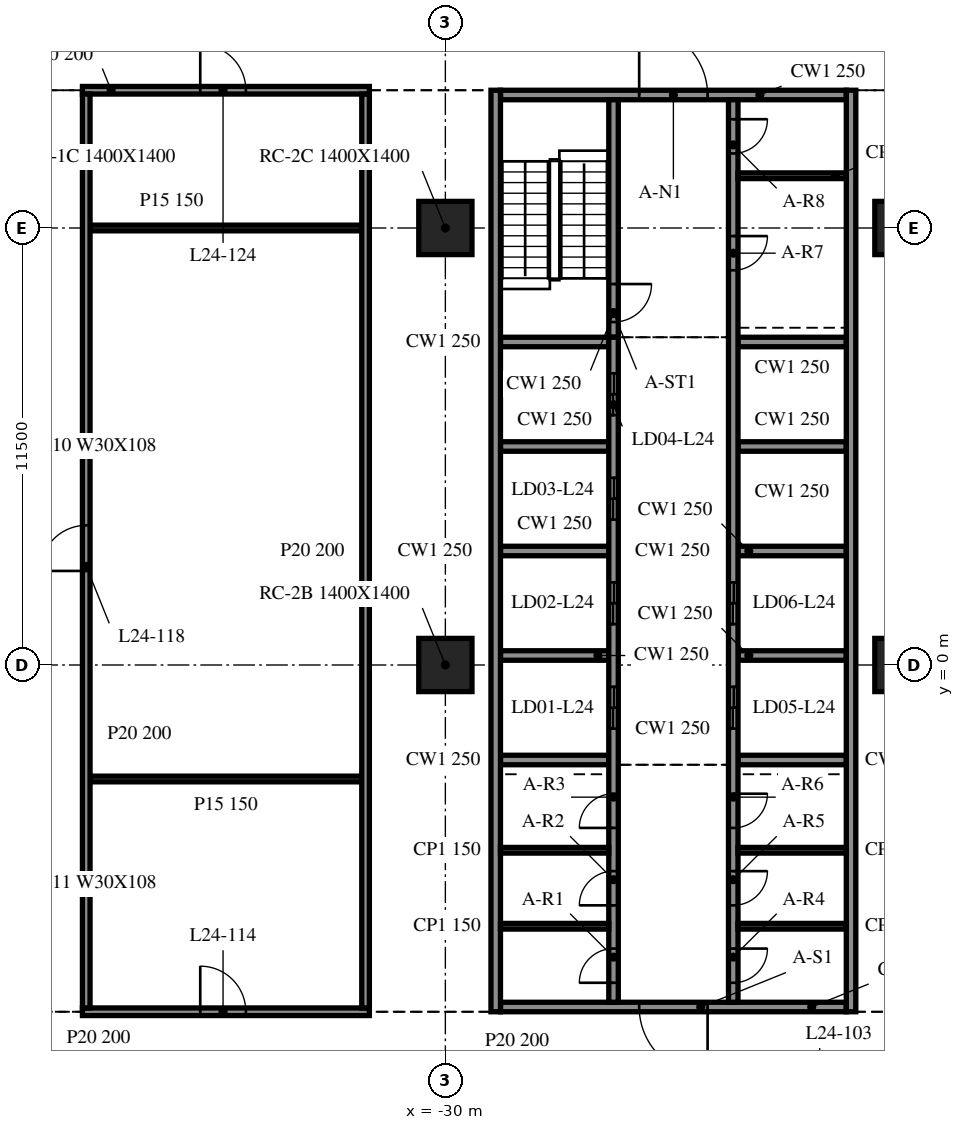
"""IFC4 building model, lengths in metres.
Left out: names, types, materials, properties, quantities, classifications, styles, units other than length and angle.
Written with IfcOpenShell. Run it as: python <this file> out.ifc"""

import sys

from ifc_helpers import new_model, si_unit, direction, frame, frame_2d, origin, origin_2d, place, context, subcontext, project, spatial, rectangle, extrude, element, fill, save


model = new_model("IFC4")
c1 = context("Model", 3, precision=1e-05, world=origin(), true_north=direction((0.0, 1.0)))
c2 = subcontext(c1, "Body", "Model", "MODEL_VIEW")
j1 = project(units=[si_unit("LENGTHUNIT", "METRE"), si_unit("PLANEANGLEUNIT", "RADIAN")], contexts=[c1])
p1 = place(None, origin())
s1 = spatial("IfcSite", under=j1, at=p1, CompositionType="ELEMENT")
p2 = place(p1, origin())
s2 = spatial("IfcBuilding", under=s1, at=p2, CompositionType="ELEMENT")
p3 = place(p2, frame((0.0, 0.0, 105.3)))
s3 = spatial("IfcBuildingStorey", under=s2, at=p3, CompositionType="ELEMENT", Elevation=105.3)
for number, where, z_axis, x_axis in (
    (1, (-30.0, 0.0, -0.34), (0.0, 0.0, 1.0), (1.0, 0.0, 0.0)),
    (2, (-30.0, 11.5, -0.34), (0.0, 0.0, 1.0), (1.0, 0.0, 0.0)),
    (3, (-18.0, 0.0, -0.34), (0.0, 0.0, 1.0), (1.0, 0.0, 0.0)),
    (4, (-18.0, 11.5, -0.34), (0.0, 0.0, 1.0), (1.0, 0.0, 0.0)),
):
    element("IfcColumn", number, at=place(p3, frame(where, z_axis=z_axis, x_axis=x_axis)), inside=s3, PredefinedType="COLUMN", context=c2, shape_type="SweptSolid", body=[
        extrude(rectangle(XDim=1.4, YDim=1.4, at=origin_2d()), origin(), (0.0, 0.0, 1.0), 4.1),
    ])
for number, where, z_axis, x_axis in (
    (5, (-28.675, 15.125, 0.0), (0.0, 0.0, 1.0), (0.0, -1.0, 0.0)),
    (6, (-19.325, -9.125, 0.0), (0.0, 0.0, 1.0), (0.0, 1.0, 0.0)),
):
    element("IfcWall", number, at=place(p3, frame(where, z_axis=z_axis, x_axis=x_axis)), inside=s3, PredefinedType="SOLIDWALL", context=c2, shape_type="SweptSolid", body=[
        extrude(rectangle(XDim=24.25, YDim=0.25, at=frame_2d((12.125, 0.0))), origin(), (0.0, 0.0, 1.0), 3.76),
    ])
p4 = place(p3, frame((-19.45, -9.0, 0.0), z_axis=(0.0, 0.0, 1.0), x_axis=(-1.0, 0.0, 0.0)))
e7 = element("IfcWall", 7, at=p4, inside=s3, PredefinedType="SOLIDWALL", context=c2, shape_type="SweptSolid", body=[
    extrude(rectangle(XDim=9.1, YDim=0.25, at=frame_2d((4.55, 0.0))), origin(), (0.0, 0.0, 1.0), 3.76),
])
p5 = place(p4, frame((3.65, 0.0, 0.0)))
e8 = element("IfcOpeningElement", 8, at=p5, cuts=e7, PredefinedType="OPENING", context=c2, shape_type="SweptSolid", body=[
    extrude(rectangle(XDim=1.8, YDim=2.1, at=frame_2d((0.9, 1.05))), frame((0.0, 0.135, 0.0), z_axis=(0.0, -1.0, 0.0), x_axis=(1.0, 0.0, 0.0)), (0.0, 0.0, 1.0), 0.27),
])
p6 = place(p3, frame((-28.55, 15.0, 0.0), z_axis=(0.0, 0.0, 1.0), x_axis=(1.0, 0.0, 0.0)))
e9 = element("IfcWall", 9, at=p6, inside=s3, PredefinedType="SOLIDWALL", context=c2, shape_type="SweptSolid", body=[
    extrude(rectangle(XDim=9.1, YDim=0.25, at=frame_2d((4.55, 0.0))), origin(), (0.0, 0.0, 1.0), 3.76),
])
p7 = place(p6, frame((3.65, 0.0, 0.0)))
e10 = element("IfcOpeningElement", 10, at=p7, cuts=e9, PredefinedType="OPENING", context=c2, shape_type="SweptSolid", body=[
    extrude(rectangle(XDim=1.8, YDim=2.1, at=frame_2d((0.9, 1.05))), frame((0.0, 0.135, 0.0), z_axis=(0.0, -1.0, 0.0), x_axis=(1.0, 0.0, 0.0)), (0.0, 0.0, 1.0), 0.27),
])
p8 = place(p3, frame((-25.575, -8.875, 0.0), z_axis=(0.0, 0.0, 1.0), x_axis=(0.0, 1.0, 0.0)))
e11 = element("IfcWall", 11, at=p8, inside=s3, PredefinedType="SOLIDWALL", context=c2, shape_type="SweptSolid", body=[
    extrude(rectangle(XDim=17.5, YDim=0.25, at=frame_2d((8.75, 0.0))), origin(), (0.0, 0.0, 1.0), 3.76),
])
p9 = place(p8, frame((7.2, 0.0, 0.0)))
e12 = element("IfcOpeningElement", 12, at=p9, cuts=e11, PredefinedType="OPENING", context=c2, shape_type="SweptSolid", body=[
    extrude(rectangle(XDim=1.1, YDim=2.1, at=frame_2d((0.55, 1.05))), frame((0.0, 0.135, 0.0), z_axis=(0.0, -1.0, 0.0), x_axis=(1.0, 0.0, 0.0)), (0.0, 0.0, 1.0), 0.27),
])
p10 = place(p8, frame((9.95, 0.0, 0.0)))
e13 = element("IfcOpeningElement", 13, at=p10, cuts=e11, PredefinedType="OPENING", context=c2, shape_type="SweptSolid", body=[
    extrude(rectangle(XDim=1.1, YDim=2.1, at=frame_2d((0.55, 1.05))), frame((0.0, 0.135, 0.0), z_axis=(0.0, -1.0, 0.0), x_axis=(1.0, 0.0, 0.0)), (0.0, 0.0, 1.0), 0.27),
])
p11 = place(p8, frame((12.7, 0.0, 0.0)))
e14 = element("IfcOpeningElement", 14, at=p11, cuts=e11, PredefinedType="OPENING", context=c2, shape_type="SweptSolid", body=[
    extrude(rectangle(XDim=1.1, YDim=2.1, at=frame_2d((0.55, 1.05))), frame((0.0, 0.135, 0.0), z_axis=(0.0, -1.0, 0.0), x_axis=(1.0, 0.0, 0.0)), (0.0, 0.0, 1.0), 0.27),
])
p12 = place(p8, frame((15.45, 0.0, 0.0)))
e15 = element("IfcOpeningElement", 15, at=p12, cuts=e11, PredefinedType="OPENING", context=c2, shape_type="SweptSolid", body=[
    extrude(rectangle(XDim=1.1, YDim=2.1, at=frame_2d((0.55, 1.05))), frame((0.0, 0.135, 0.0), z_axis=(0.0, -1.0, 0.0), x_axis=(1.0, 0.0, 0.0)), (0.0, 0.0, 1.0), 0.27),
])
p13 = place(p8, frame((0.512, 0.0, 0.0)))
e16 = element("IfcOpeningElement", 16, at=p13, cuts=e11, PredefinedType="OPENING", context=c2, shape_type="SweptSolid", body=[
    extrude(rectangle(XDim=0.9, YDim=2.1, at=frame_2d((0.45, 1.05))), frame((0.0, 0.135, 0.0), z_axis=(0.0, -1.0, 0.0), x_axis=(1.0, 0.0, 0.0)), (0.0, 0.0, 1.0), 0.27),
])
p14 = place(p8, frame((2.55, 0.0, 0.0)))
e17 = element("IfcOpeningElement", 17, at=p14, cuts=e11, PredefinedType="OPENING", context=c2, shape_type="SweptSolid", body=[
    extrude(rectangle(XDim=0.9, YDim=2.1, at=frame_2d((0.45, 1.05))), frame((0.0, 0.135, 0.0), z_axis=(0.0, -1.0, 0.0), x_axis=(1.0, 0.0, 0.0)), (0.0, 0.0, 1.0), 0.27),
])
p15 = place(p8, frame((4.587, 0.0, 0.0)))
e18 = element("IfcOpeningElement", 18, at=p15, cuts=e11, PredefinedType="OPENING", context=c2, shape_type="SweptSolid", body=[
    extrude(rectangle(XDim=0.9, YDim=2.1, at=frame_2d((0.45, 1.05))), frame((0.0, 0.135, 0.0), z_axis=(0.0, -1.0, 0.0), x_axis=(1.0, 0.0, 0.0)), (0.0, 0.0, 1.0), 0.27),
])
p16 = place(p3, frame((-25.575, 14.875, 0.0), z_axis=(0.0, 0.0, 1.0), x_axis=(0.0, -1.0, 0.0)))
e19 = element("IfcWall", 19, at=p16, inside=s3, PredefinedType="SOLIDWALL", context=c2, shape_type="SweptSolid", body=[
    extrude(rectangle(XDim=6.25, YDim=0.25, at=frame_2d((3.125, 0.0))), origin(), (0.0, 0.0, 1.0), 3.76),
])
p17 = place(p16, frame((4.85, 0.0, 0.0)))
e20 = element("IfcOpeningElement", 20, at=p17, cuts=e19, PredefinedType="OPENING", context=c2, shape_type="SweptSolid", body=[
    extrude(rectangle(XDim=1.0, YDim=2.1, at=frame_2d((0.5, 1.05))), frame((0.0, 0.135, 0.0), z_axis=(0.0, -1.0, 0.0), x_axis=(1.0, 0.0, 0.0)), (0.0, 0.0, 1.0), 0.27),
])
p18 = place(p3, frame((-22.425, 14.875, 0.0), z_axis=(0.0, 0.0, 1.0), x_axis=(0.0, -1.0, 0.0)))
e21 = element("IfcWall", 21, at=p18, inside=s3, PredefinedType="SOLIDWALL", context=c2, shape_type="SweptSolid", body=[
    extrude(rectangle(XDim=23.75, YDim=0.25, at=frame_2d((11.875, 0.0))), origin(), (0.0, 0.0, 1.0), 3.76),
])
p19 = place(p18, frame((15.45, 0.0, 0.0)))
e22 = element("IfcOpeningElement", 22, at=p19, cuts=e21, PredefinedType="OPENING", context=c2, shape_type="SweptSolid", body=[
    extrude(rectangle(XDim=1.1, YDim=2.1, at=frame_2d((0.55, 1.05))), frame((0.0, 0.135, 0.0), z_axis=(0.0, -1.0, 0.0), x_axis=(1.0, 0.0, 0.0)), (0.0, 0.0, 1.0), 0.27),
])
p20 = place(p18, frame((12.7, 0.0, 0.0)))
e23 = element("IfcOpeningElement", 23, at=p20, cuts=e21, PredefinedType="OPENING", context=c2, shape_type="SweptSolid", body=[
    extrude(rectangle(XDim=1.1, YDim=2.1, at=frame_2d((0.55, 1.05))), frame((0.0, 0.135, 0.0), z_axis=(0.0, -1.0, 0.0), x_axis=(1.0, 0.0, 0.0)), (0.0, 0.0, 1.0), 0.27),
])
p21 = place(p18, frame((22.337, 0.0, 0.0)))
e24 = element("IfcOpeningElement", 24, at=p21, cuts=e21, PredefinedType="OPENING", context=c2, shape_type="SweptSolid", body=[
    extrude(rectangle(XDim=0.9, YDim=2.1, at=frame_2d((0.45, 1.05))), frame((0.0, 0.135, 0.0), z_axis=(0.0, -1.0, 0.0), x_axis=(1.0, 0.0, 0.0)), (0.0, 0.0, 1.0), 0.27),
])
p22 = place(p18, frame((20.3, 0.0, 0.0)))
e25 = element("IfcOpeningElement", 25, at=p22, cuts=e21, PredefinedType="OPENING", context=c2, shape_type="SweptSolid", body=[
    extrude(rectangle(XDim=0.9, YDim=2.1, at=frame_2d((0.45, 1.05))), frame((0.0, 0.135, 0.0), z_axis=(0.0, -1.0, 0.0), x_axis=(1.0, 0.0, 0.0)), (0.0, 0.0, 1.0), 0.27),
])
p23 = place(p18, frame((18.262, 0.0, 0.0)))
e26 = element("IfcOpeningElement", 26, at=p23, cuts=e21, PredefinedType="OPENING", context=c2, shape_type="SweptSolid", body=[
    extrude(rectangle(XDim=0.9, YDim=2.1, at=frame_2d((0.45, 1.05))), frame((0.0, 0.135, 0.0), z_axis=(0.0, -1.0, 0.0), x_axis=(1.0, 0.0, 0.0)), (0.0, 0.0, 1.0), 0.27),
])
p24 = place(p18, frame((3.587, 0.0, 0.0)))
e27 = element("IfcOpeningElement", 27, at=p24, cuts=e21, PredefinedType="OPENING", context=c2, shape_type="SweptSolid", body=[
    extrude(rectangle(XDim=0.9, YDim=2.1, at=frame_2d((0.45, 1.05))), frame((0.0, 0.135, 0.0), z_axis=(0.0, -1.0, 0.0), x_axis=(1.0, 0.0, 0.0)), (0.0, 0.0, 1.0), 0.27),
])
p25 = place(p18, frame((0.512, 0.0, 0.0)))
e28 = element("IfcOpeningElement", 28, at=p25, cuts=e21, PredefinedType="OPENING", context=c2, shape_type="SweptSolid", body=[
    extrude(rectangle(XDim=0.9, YDim=2.1, at=frame_2d((0.45, 1.05))), frame((0.0, 0.135, 0.0), z_axis=(0.0, -1.0, 0.0), x_axis=(1.0, 0.0, 0.0)), (0.0, 0.0, 1.0), 0.27),
])
for number, where, z_axis, x_axis in (
    (29, (-28.55, -2.5, 0.0), (0.0, 0.0, 1.0), (1.0, 0.0, 0.0)),
    (30, (-28.55, 0.25, 0.0), (0.0, 0.0, 1.0), (1.0, 0.0, 0.0)),
    (31, (-28.55, 3.0, 0.0), (0.0, 0.0, 1.0), (1.0, 0.0, 0.0)),
    (32, (-28.55, 5.75, 0.0), (0.0, 0.0, 1.0), (1.0, 0.0, 0.0)),
    (33, (-28.55, 8.5, 0.0), (0.0, 0.0, 1.0), (1.0, 0.0, 0.0)),
    (34, (-22.3, -2.5, 0.0), (0.0, 0.0, 1.0), (1.0, 0.0, 0.0)),
    (35, (-22.3, 0.25, 0.0), (0.0, 0.0, 1.0), (1.0, 0.0, 0.0)),
    (36, (-22.3, 3.0, 0.0), (0.0, 0.0, 1.0), (1.0, 0.0, 0.0)),
    (37, (-22.3, 5.75, 0.0), (0.0, 0.0, 1.0), (1.0, 0.0, 0.0)),
    (38, (-22.3, 8.5, 0.0), (0.0, 0.0, 1.0), (1.0, 0.0, 0.0)),
):
    element("IfcWall", number, at=place(p3, frame(where, z_axis=z_axis, x_axis=x_axis)), inside=s3, PredefinedType="SOLIDWALL", context=c2, shape_type="SweptSolid", body=[
        extrude(rectangle(XDim=2.85, YDim=0.25, at=frame_2d((1.425, 0.0))), origin(), (0.0, 0.0, 1.0), 3.76),
    ])
for number, where, z_axis, x_axis in (
    (39, (-28.55, -6.875, 0.0), (0.0, 0.0, 1.0), (1.0, 0.0, 0.0)),
    (40, (-28.55, -4.875, 0.0), (0.0, 0.0, 1.0), (1.0, 0.0, 0.0)),
    (41, (-22.3, -6.875, 0.0), (0.0, 0.0, 1.0), (1.0, 0.0, 0.0)),
    (42, (-22.3, -4.875, 0.0), (0.0, 0.0, 1.0), (1.0, 0.0, 0.0)),
    (43, (-22.3, 12.875, 0.0), (0.0, 0.0, 1.0), (1.0, 0.0, 0.0)),
):
    element("IfcWall", number, at=place(p3, frame(where, z_axis=z_axis, x_axis=x_axis)), inside=s3, PredefinedType="PARTITIONING", context=c2, shape_type="SweptSolid", body=[
        extrude(rectangle(XDim=2.85, YDim=0.15, at=frame_2d((1.425, 0.0))), origin(), (0.0, 0.0, 1.0), 3.76),
    ])
p26 = place(p3, frame((-39.55, -9.125, 0.0), z_axis=(0.0, 0.0, 1.0), x_axis=(1.0, 0.0, 0.0)))
e44 = element("IfcWall", 44, at=p26, inside=s3, PredefinedType="PARTITIONING", context=c2, shape_type="SweptSolid", body=[
    extrude(rectangle(XDim=7.55, YDim=0.2, at=frame_2d((3.775, 0.0))), origin(), (0.0, 0.0, 1.0), 3.76),
])
p27 = place(p26, frame((3.1, 0.0, 0.0)))
e45 = element("IfcOpeningElement", 45, at=p27, cuts=e44, PredefinedType="OPENING", context=c2, shape_type="SweptSolid", body=[
    extrude(rectangle(XDim=1.2, YDim=2.1, at=frame_2d((0.6, 1.05))), frame((0.0, 0.11, 0.0), z_axis=(0.0, -1.0, 0.0), x_axis=(1.0, 0.0, 0.0)), (0.0, 0.0, 1.0), 0.22),
])
for number, where, z_axis, x_axis in (
    (46, (-39.35, -3.0, 0.0), (0.0, 0.0, 1.0), (1.0, 0.0, 0.0)),
    (47, (-39.35, 11.5, 0.0), (0.0, 0.0, 1.0), (1.0, 0.0, 0.0)),
):
    element("IfcWall", number, at=place(p3, frame(where, z_axis=z_axis, x_axis=x_axis)), inside=s3, PredefinedType="PARTITIONING", context=c2, shape_type="SweptSolid", body=[
        extrude(rectangle(XDim=7.15, YDim=0.15, at=frame_2d((3.575, 0.0))), origin(), (0.0, 0.0, 1.0), 3.76),
    ])
p28 = place(p3, frame((-39.55, 15.125, 0.0), z_axis=(0.0, 0.0, 1.0), x_axis=(1.0, 0.0, 0.0)))
e48 = element("IfcWall", 48, at=p28, inside=s3, PredefinedType="PARTITIONING", context=c2, shape_type="SweptSolid", body=[
    extrude(rectangle(XDim=7.55, YDim=0.2, at=frame_2d((3.775, 0.0))), origin(), (0.0, 0.0, 1.0), 3.76),
])
p29 = place(p28, frame((3.1, 0.0, 0.0)))
e49 = element("IfcOpeningElement", 49, at=p29, cuts=e48, PredefinedType="OPENING", context=c2, shape_type="SweptSolid", body=[
    extrude(rectangle(XDim=1.2, YDim=2.1, at=frame_2d((0.6, 1.05))), frame((0.0, 0.11, 0.0), z_axis=(0.0, -1.0, 0.0), x_axis=(1.0, 0.0, 0.0)), (0.0, 0.0, 1.0), 0.22),
])
p30 = place(p3, frame((-39.45, -9.025, 0.0), z_axis=(0.0, 0.0, 1.0), x_axis=(0.0, 1.0, 0.0)))
e50 = element("IfcWall", 50, at=p30, inside=s3, PredefinedType="PARTITIONING", context=c2, shape_type="SweptSolid", body=[
    extrude(rectangle(XDim=24.05, YDim=0.2, at=frame_2d((12.025, 0.0))), origin(), (0.0, 0.0, 1.0), 3.76),
])
p31 = place(p30, frame((11.5, 0.0, 0.0)))
e51 = element("IfcOpeningElement", 51, at=p31, cuts=e50, PredefinedType="OPENING", context=c2, shape_type="SweptSolid", body=[
    extrude(rectangle(XDim=1.2, YDim=2.1, at=frame_2d((0.6, 1.05))), frame((0.0, 0.11, 0.0), z_axis=(0.0, -1.0, 0.0), x_axis=(1.0, 0.0, 0.0)), (0.0, 0.0, 1.0), 0.22),
])
p32 = place(p3, frame((-32.1, -9.025, 0.0), z_axis=(0.0, 0.0, 1.0), x_axis=(0.0, 1.0, 0.0)))
e52 = element("IfcWall", 52, at=p32, inside=s3, PredefinedType="PARTITIONING", context=c2, shape_type="SweptSolid", body=[
    extrude(rectangle(XDim=24.05, YDim=0.2, at=frame_2d((12.025, 0.0))), origin(), (0.0, 0.0, 1.0), 3.76),
])
p33 = place(p5, origin())
e53 = element("IfcDoor", 53, at=p33, inside=s3, OperationType="DOUBLE_DOOR_SINGLE_SWING", PredefinedType="DOOR", context=c2, shape_type="SweptSolid", body=[
    extrude(rectangle(XDim=1.8, YDim=2.1, at=frame_2d((0.9, 1.05))), frame((0.0, 0.025, 0.0), z_axis=(0.0, -1.0, 0.0), x_axis=(1.0, 0.0, 0.0)), (0.0, 0.0, 1.0), 0.05),
])
fill(e8, e53)
p34 = place(p7, origin())
e54 = element("IfcDoor", 54, at=p34, inside=s3, OperationType="DOUBLE_DOOR_SINGLE_SWING", PredefinedType="DOOR", context=c2, shape_type="SweptSolid", body=[
    extrude(rectangle(XDim=1.8, YDim=2.1, at=frame_2d((0.9, 1.05))), frame((0.0, 0.025, 0.0), z_axis=(0.0, -1.0, 0.0), x_axis=(1.0, 0.0, 0.0)), (0.0, 0.0, 1.0), 0.05),
])
fill(e10, e54)
p35 = place(p19, origin())
e55 = element("IfcDoor", 55, at=p35, inside=s3, OperationType="DOUBLE_DOOR_SLIDING", PredefinedType="DOOR", context=c2, shape_type="SweptSolid", body=[
    extrude(rectangle(XDim=1.1, YDim=2.1, at=frame_2d((0.55, 1.05))), frame((0.0, 0.025, 0.0), z_axis=(0.0, -1.0, 0.0), x_axis=(1.0, 0.0, 0.0)), (0.0, 0.0, 1.0), 0.05),
])
fill(e22, e55)
p36 = place(p20, origin())
e56 = element("IfcDoor", 56, at=p36, inside=s3, OperationType="DOUBLE_DOOR_SLIDING", PredefinedType="DOOR", context=c2, shape_type="SweptSolid", body=[
    extrude(rectangle(XDim=1.1, YDim=2.1, at=frame_2d((0.55, 1.05))), frame((0.0, 0.025, 0.0), z_axis=(0.0, -1.0, 0.0), x_axis=(1.0, 0.0, 0.0)), (0.0, 0.0, 1.0), 0.05),
])
fill(e23, e56)
p37 = place(p9, origin())
e57 = element("IfcDoor", 57, at=p37, inside=s3, OperationType="DOUBLE_DOOR_SLIDING", PredefinedType="DOOR", context=c2, shape_type="SweptSolid", body=[
    extrude(rectangle(XDim=1.1, YDim=2.1, at=frame_2d((0.55, 1.05))), frame((0.0, 0.025, 0.0), z_axis=(0.0, -1.0, 0.0), x_axis=(1.0, 0.0, 0.0)), (0.0, 0.0, 1.0), 0.05),
])
fill(e12, e57)
p38 = place(p10, origin())
e58 = element("IfcDoor", 58, at=p38, inside=s3, OperationType="DOUBLE_DOOR_SLIDING", PredefinedType="DOOR", context=c2, shape_type="SweptSolid", body=[
    extrude(rectangle(XDim=1.1, YDim=2.1, at=frame_2d((0.55, 1.05))), frame((0.0, 0.025, 0.0), z_axis=(0.0, -1.0, 0.0), x_axis=(1.0, 0.0, 0.0)), (0.0, 0.0, 1.0), 0.05),
])
fill(e13, e58)
p39 = place(p11, origin())
e59 = element("IfcDoor", 59, at=p39, inside=s3, OperationType="DOUBLE_DOOR_SLIDING", PredefinedType="DOOR", context=c2, shape_type="SweptSolid", body=[
    extrude(rectangle(XDim=1.1, YDim=2.1, at=frame_2d((0.55, 1.05))), frame((0.0, 0.025, 0.0), z_axis=(0.0, -1.0, 0.0), x_axis=(1.0, 0.0, 0.0)), (0.0, 0.0, 1.0), 0.05),
])
fill(e14, e59)
p40 = place(p12, origin())
e60 = element("IfcDoor", 60, at=p40, inside=s3, OperationType="DOUBLE_DOOR_SLIDING", PredefinedType="DOOR", context=c2, shape_type="SweptSolid", body=[
    extrude(rectangle(XDim=1.1, YDim=2.1, at=frame_2d((0.55, 1.05))), frame((0.0, 0.025, 0.0), z_axis=(0.0, -1.0, 0.0), x_axis=(1.0, 0.0, 0.0)), (0.0, 0.0, 1.0), 0.05),
])
fill(e15, e60)
p41 = place(p13, origin())
e61 = element("IfcDoor", 61, at=p41, inside=s3, OperationType="SINGLE_SWING_LEFT", PredefinedType="DOOR", context=c2, shape_type="SweptSolid", body=[
    extrude(rectangle(XDim=0.9, YDim=2.1, at=frame_2d((0.45, 1.05))), frame((0.0, 0.025, 0.0), z_axis=(0.0, -1.0, 0.0), x_axis=(1.0, 0.0, 0.0)), (0.0, 0.0, 1.0), 0.05),
])
fill(e16, e61)
p42 = place(p14, origin())
e62 = element("IfcDoor", 62, at=p42, inside=s3, OperationType="SINGLE_SWING_RIGHT", PredefinedType="DOOR", context=c2, shape_type="SweptSolid", body=[
    extrude(rectangle(XDim=0.9, YDim=2.1, at=frame_2d((0.45, 1.05))), frame((0.0, 0.025, 0.0), z_axis=(0.0, -1.0, 0.0), x_axis=(1.0, 0.0, 0.0)), (0.0, 0.0, 1.0), 0.05),
])
fill(e17, e62)
p43 = place(p15, origin())
e63 = element("IfcDoor", 63, at=p43, inside=s3, OperationType="SINGLE_SWING_LEFT", PredefinedType="DOOR", context=c2, shape_type="SweptSolid", body=[
    extrude(rectangle(XDim=0.9, YDim=2.1, at=frame_2d((0.45, 1.05))), frame((0.0, 0.025, 0.0), z_axis=(0.0, -1.0, 0.0), x_axis=(1.0, 0.0, 0.0)), (0.0, 0.0, 1.0), 0.05),
])
fill(e18, e63)
p44 = place(p21, origin())
e64 = element("IfcDoor", 64, at=p44, inside=s3, OperationType="SINGLE_SWING_RIGHT", PredefinedType="DOOR", context=c2, shape_type="SweptSolid", body=[
    extrude(rectangle(XDim=0.9, YDim=2.1, at=frame_2d((0.45, 1.05))), frame((0.0, 0.025, 0.0), z_axis=(0.0, -1.0, 0.0), x_axis=(1.0, 0.0, 0.0)), (0.0, 0.0, 1.0), 0.05),
])
fill(e24, e64)
p45 = place(p22, origin())
e65 = element("IfcDoor", 65, at=p45, inside=s3, OperationType="SINGLE_SWING_LEFT", PredefinedType="DOOR", context=c2, shape_type="SweptSolid", body=[
    extrude(rectangle(XDim=0.9, YDim=2.1, at=frame_2d((0.45, 1.05))), frame((0.0, 0.025, 0.0), z_axis=(0.0, -1.0, 0.0), x_axis=(1.0, 0.0, 0.0)), (0.0, 0.0, 1.0), 0.05),
])
fill(e25, e65)
p46 = place(p23, origin())
e66 = element("IfcDoor", 66, at=p46, inside=s3, OperationType="SINGLE_SWING_RIGHT", PredefinedType="DOOR", context=c2, shape_type="SweptSolid", body=[
    extrude(rectangle(XDim=0.9, YDim=2.1, at=frame_2d((0.45, 1.05))), frame((0.0, 0.025, 0.0), z_axis=(0.0, -1.0, 0.0), x_axis=(1.0, 0.0, 0.0)), (0.0, 0.0, 1.0), 0.05),
])
fill(e26, e66)
p47 = place(p24, origin())
e67 = element("IfcDoor", 67, at=p47, inside=s3, OperationType="SINGLE_SWING_LEFT", PredefinedType="DOOR", context=c2, shape_type="SweptSolid", body=[
    extrude(rectangle(XDim=0.9, YDim=2.1, at=frame_2d((0.45, 1.05))), frame((0.0, 0.025, 0.0), z_axis=(0.0, -1.0, 0.0), x_axis=(1.0, 0.0, 0.0)), (0.0, 0.0, 1.0), 0.05),
])
fill(e27, e67)
p48 = place(p25, origin())
e68 = element("IfcDoor", 68, at=p48, inside=s3, OperationType="SINGLE_SWING_RIGHT", PredefinedType="DOOR", context=c2, shape_type="SweptSolid", body=[
    extrude(rectangle(XDim=0.9, YDim=2.1, at=frame_2d((0.45, 1.05))), frame((0.0, 0.025, 0.0), z_axis=(0.0, -1.0, 0.0), x_axis=(1.0, 0.0, 0.0)), (0.0, 0.0, 1.0), 0.05),
])
fill(e28, e68)
p49 = place(p17, origin())
e69 = element("IfcDoor", 69, at=p49, inside=s3, OperationType="SINGLE_SWING_LEFT", PredefinedType="DOOR", context=c2, shape_type="SweptSolid", body=[
    extrude(rectangle(XDim=1.0, YDim=2.1, at=frame_2d((0.5, 1.05))), frame((0.0, 0.025, 0.0), z_axis=(0.0, -1.0, 0.0), x_axis=(1.0, 0.0, 0.0)), (0.0, 0.0, 1.0), 0.05),
])
fill(e20, e69)
p50 = place(p27, origin())
e70 = element("IfcDoor", 70, at=p50, inside=s3, OperationType="SINGLE_SWING_LEFT", PredefinedType="DOOR", context=c2, shape_type="SweptSolid", body=[
    extrude(rectangle(XDim=1.2, YDim=2.1, at=frame_2d((0.6, 1.05))), frame((0.0, 0.025, 0.0), z_axis=(0.0, -1.0, 0.0), x_axis=(1.0, 0.0, 0.0)), (0.0, 0.0, 1.0), 0.05),
])
fill(e45, e70)
p51 = place(p31, origin())
e71 = element("IfcDoor", 71, at=p51, inside=s3, OperationType="SINGLE_SWING_LEFT", PredefinedType="DOOR", context=c2, shape_type="SweptSolid", body=[
    extrude(rectangle(XDim=1.2, YDim=2.1, at=frame_2d((0.6, 1.05))), frame((0.0, 0.025, 0.0), z_axis=(0.0, -1.0, 0.0), x_axis=(1.0, 0.0, 0.0)), (0.0, 0.0, 1.0), 0.05),
])
fill(e51, e71)
p52 = place(p29, origin())
e72 = element("IfcDoor", 72, at=p52, inside=s3, OperationType="SINGLE_SWING_RIGHT", PredefinedType="DOOR", context=c2, shape_type="SweptSolid", body=[
    extrude(rectangle(XDim=1.2, YDim=2.1, at=frame_2d((0.6, 1.05))), frame((0.0, 0.025, 0.0), z_axis=(0.0, -1.0, 0.0), x_axis=(1.0, 0.0, 0.0)), (0.0, 0.0, 1.0), 0.05),
])
fill(e49, e72)
save(model, sys.argv[1])
